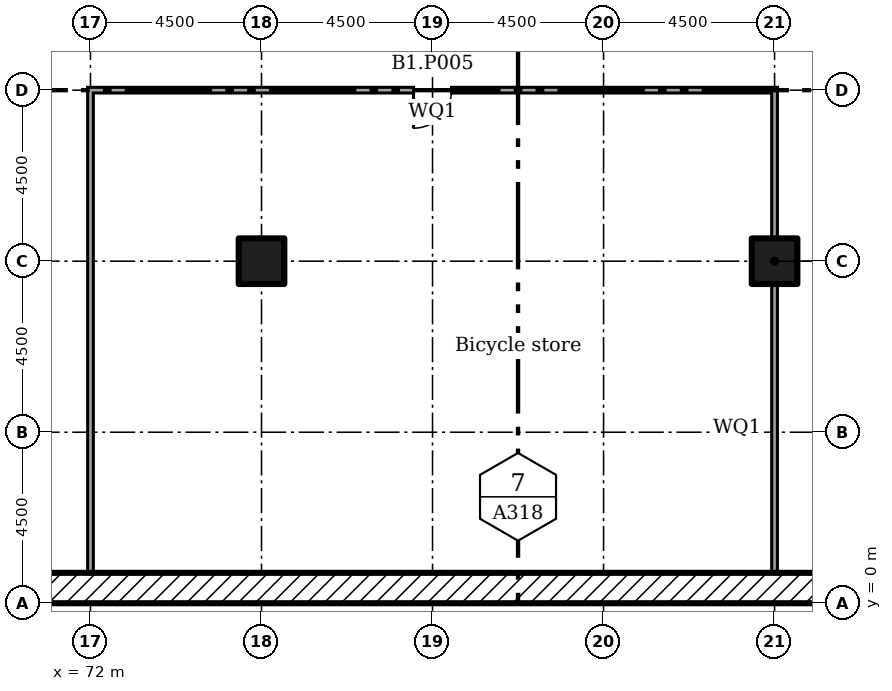
"""IFC4 building model, lengths in metres.
Left out: names, types, materials, properties, quantities, classifications, styles, units other than length and angle.
Written with IfcOpenShell. Run it as: python <this file> out.ifc"""

import sys

from ifc_helpers import new_model, si_unit, direction, frame, frame_2d, origin, origin_2d, place, context, subcontext, project, spatial, rectangle, extrude, element, fill, save


model = new_model("IFC4")
c1 = context("Model", 3, precision=1e-05, world=origin(), true_north=direction((0.0, 1.0)))
c2 = subcontext(c1, "Body", "Model", "MODEL_VIEW")
j1 = project(units=[si_unit("LENGTHUNIT", "METRE"), si_unit("PLANEANGLEUNIT", "RADIAN")], contexts=[c1])
p1 = place(None, origin())
s1 = spatial("IfcSite", under=j1, at=p1, CompositionType="ELEMENT")
p2 = place(p1, origin())
s2 = spatial("IfcBuilding", under=s1, at=p2, CompositionType="ELEMENT")
p3 = place(p2, frame((0.0, 0.0, -4.0)))
s3 = spatial("IfcBuildingStorey", under=s2, at=p3, CompositionType="ELEMENT", Elevation=-4.0)
for number, where in (
    (1, (76.5, 9.0, 0.0)),
    (2, (90.0, 9.0, 0.0)),
):
    element("IfcColumn", number, at=place(p3, frame(where)), inside=s3, PredefinedType="COLUMN", context=c2, shape_type="SweptSolid", body=[
        extrude(rectangle(XDim=1.2, YDim=1.2, at=origin_2d()), origin(), (0.0, 0.0, 1.0), 4.0),
    ])
p4 = place(p3, frame((0.0, 0.4, 0.0)))
e3 = element("IfcWall", 3, at=p4, inside=s3, PredefinedType="SOLIDWALL", context=c2, shape_type="SweptSolid", body=[
    extrude(rectangle(XDim=153.0, YDim=0.8, at=frame_2d((76.5, 0.0))), origin(), (0.0, 0.0, 1.0), 4.0),
])
p5 = place(p3, frame((72.0, 0.8, 0.0), z_axis=(0.0, 0.0, 1.0), x_axis=(0.0, 1.0, 0.0)))
e4 = element("IfcWall", 4, at=p5, inside=s3, PredefinedType="PARTITIONING", context=c2, shape_type="SweptSolid", body=[
    extrude(rectangle(XDim=12.775, YDim=0.15, at=frame_2d((6.387, 0.0))), origin(), (0.0, 0.0, 1.0), 3.55),
])
p6 = place(p3, frame((90.0, 0.8, 0.0), z_axis=(0.0, 0.0, 1.0), x_axis=(0.0, 1.0, 0.0)))
e5 = element("IfcWall", 5, at=p6, inside=s3, PredefinedType="PARTITIONING", context=c2, shape_type="SweptSolid", body=[
    extrude(rectangle(XDim=7.605, YDim=0.15, at=frame_2d((3.802, 0.0))), origin(), (0.0, 0.0, 1.0), 3.55),
])
p7 = place(p3, frame((90.0, 9.595, 0.0), z_axis=(0.0, 0.0, 1.0), x_axis=(0.0, 1.0, 0.0)))
e6 = element("IfcWall", 6, at=p7, inside=s3, PredefinedType="PARTITIONING", context=c2, shape_type="SweptSolid", body=[
    extrude(rectangle(XDim=3.98, YDim=0.15, at=frame_2d((1.99, 0.0))), origin(), (0.0, 0.0, 1.0), 3.55),
])
p8 = place(p3, frame((72.075, 13.5, 0.0)))
e7 = element("IfcWall", 7, at=p8, inside=s3, PredefinedType="PARTITIONING", context=c2, shape_type="SweptSolid", body=[
    extrude(rectangle(XDim=17.85, YDim=0.15, at=frame_2d((8.925, 0.0))), origin(), (0.0, 0.0, 1.0), 3.55),
])
p9 = place(p8, frame((8.425, 0.0, 0.0)))
e8 = element("IfcOpeningElement", 8, at=p9, cuts=e7, PredefinedType="OPENING", context=c2, shape_type="SweptSolid", body=[
    extrude(rectangle(XDim=1.0, YDim=2.1, at=frame_2d((0.5, 1.05))), frame((0.0, 0.085, 0.0), z_axis=(0.0, -1.0, 0.0), x_axis=(1.0, 0.0, 0.0)), (0.0, 0.0, 1.0), 0.17),
])
p10 = place(p9, frame((1.0, 0.0, 0.0), x_axis=(-1.0, 0.0, 0.0)))
e9 = element("IfcDoor", 9, at=p10, inside=s3, OperationType="SINGLE_SWING_LEFT", PredefinedType="DOOR", context=c2, shape_type="SweptSolid", body=[
    extrude(rectangle(XDim=1.0, YDim=2.1, at=frame_2d((0.5, 1.05))), frame((0.0, 0.025, 0.0), z_axis=(0.0, -1.0, 0.0), x_axis=(1.0, 0.0, 0.0)), (0.0, 0.0, 1.0), 0.05),
])
fill(e8, e9)
save(model, sys.argv[1])
